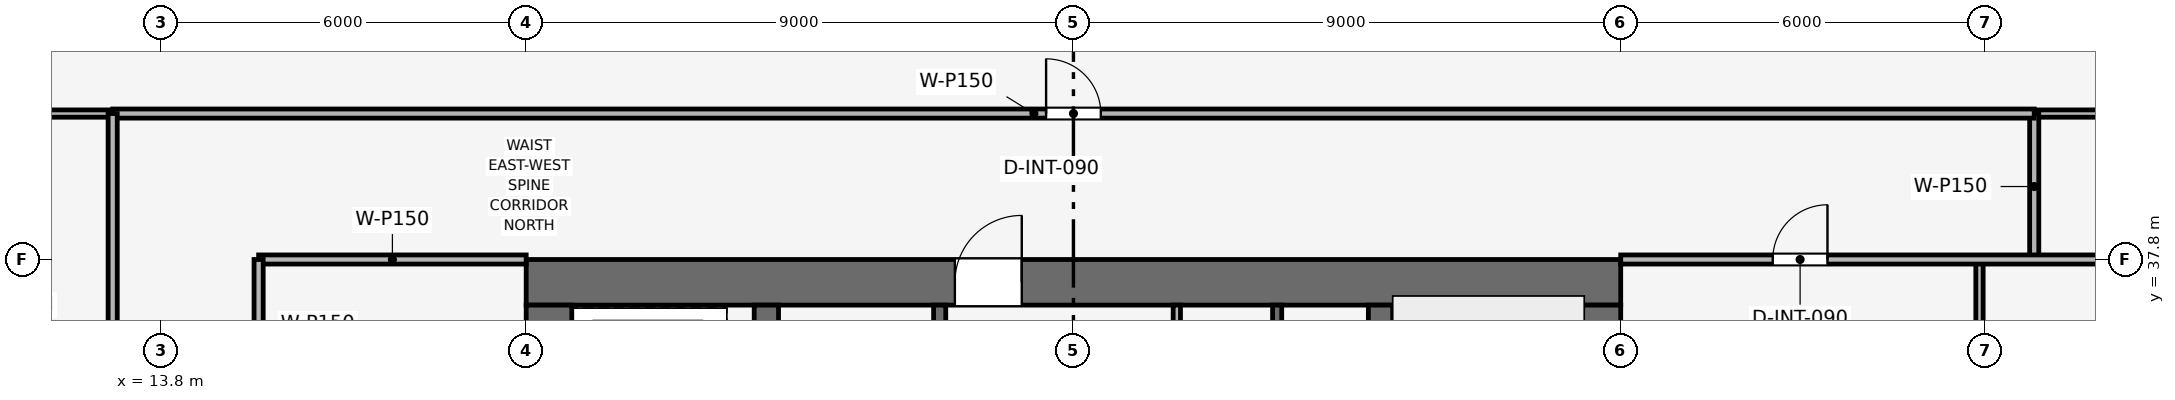
"""IFC4 building model, lengths in metres.
Left out: names, types, materials, properties, quantities, classifications, styles, units other than length and angle.
Written with IfcOpenShell. Run it as: python <this file> out.ifc"""

import sys

from ifc_helpers import new_model, si_unit, direction, frame, frame_2d, origin, place, context, subcontext, project, spatial, rectangle, extrude, element, fill, save


model = new_model("IFC4")
c1 = context("Model", 3, precision=1e-05, world=origin(), true_north=direction((0.0, 1.0)))
c2 = subcontext(c1, "Body", "Model", "MODEL_VIEW")
j1 = project(units=[si_unit("LENGTHUNIT", "METRE"), si_unit("PLANEANGLEUNIT", "RADIAN")], contexts=[c1])
p1 = place(None, origin())
s1 = spatial("IfcSite", under=j1, at=p1, CompositionType="ELEMENT")
p2 = place(p1, origin())
s2 = spatial("IfcBuilding", under=s1, at=p2, CompositionType="ELEMENT")
p3 = place(p2, frame((0.0, 0.0, 229.95)))
s3 = spatial("IfcBuildingStorey", under=s2, at=p3, CompositionType="ELEMENT", Elevation=229.95)
p4 = place(p3, frame((19.8, 37.425, 0.0), z_axis=(0.0, 0.0, 1.0), x_axis=(1.0, 0.0, 0.0)))
e1 = element("IfcWall", 1, at=p4, inside=s3, PredefinedType="SHEAR", context=c2, shape_type="SweptSolid", body=[
    extrude(rectangle(XDim=18.0, YDim=0.75, at=frame_2d((9.0, 0.0))), origin(), (0.0, 0.0, 1.0), 3.75),
])
p5 = place(p4, frame((7.05, 0.0, 0.0)))
e2 = element("IfcOpeningElement", 2, at=p5, cuts=e1, PredefinedType="OPENING", context=c2, shape_type="SweptSolid", body=[
    extrude(rectangle(XDim=1.1, YDim=2.15, at=frame_2d((0.55, 1.075))), frame((0.0, 0.385, 0.0), z_axis=(0.0, -1.0, 0.0), x_axis=(1.0, 0.0, 0.0)), (0.0, 0.0, 1.0), 0.77),
])
p6 = place(p3, frame((20.175, 20.55, 0.0), z_axis=(0.0, 0.0, 1.0), x_axis=(0.0, 1.0, 0.0)))
e3 = element("IfcWall", 3, at=p6, inside=s3, PredefinedType="SHEAR", context=c2, shape_type="SweptSolid", body=[
    extrude(rectangle(XDim=16.5, YDim=0.75, at=frame_2d((8.25, 0.0))), origin(), (0.0, 0.0, 1.0), 3.75),
])
p7 = place(p6, frame((10.25, 0.0, 0.0)))
e4 = element("IfcOpeningElement", 4, at=p7, cuts=e3, PredefinedType="OPENING", context=c2, shape_type="SweptSolid", body=[
    extrude(rectangle(XDim=1.1, YDim=2.15, at=frame_2d((0.55, 1.075))), frame((0.0, 0.385, 0.0), z_axis=(0.0, -1.0, 0.0), x_axis=(1.0, 0.0, 0.0)), (0.0, 0.0, 1.0), 0.77),
])
p8 = place(p3, frame((37.425, 20.55, 0.0), z_axis=(0.0, 0.0, 1.0), x_axis=(0.0, 1.0, 0.0)))
e5 = element("IfcWall", 5, at=p8, inside=s3, PredefinedType="SHEAR", context=c2, shape_type="SweptSolid", body=[
    extrude(rectangle(XDim=16.5, YDim=0.75, at=frame_2d((8.25, 0.0))), origin(), (0.0, 0.0, 1.0), 3.75),
])
p9 = place(p8, frame((4.75, 0.0, 0.0)))
e6 = element("IfcOpeningElement", 6, at=p9, cuts=e5, PredefinedType="OPENING", context=c2, shape_type="SweptSolid", body=[
    extrude(rectangle(XDim=1.1, YDim=2.15, at=frame_2d((0.55, 1.075))), frame((0.0, 0.385, 0.0), z_axis=(0.0, -1.0, 0.0), x_axis=(1.0, 0.0, 0.0)), (0.0, 0.0, 1.0), 0.77),
])
for number, where, z_axis, x_axis in (
    (7, (23.75, 20.55, 0.0), (0.0, 0.0, 1.0), (0.0, 1.0, 0.0)),
    (8, (33.85, 20.55, 0.0), (0.0, 0.0, 1.0), (0.0, 1.0, 0.0)),
):
    element("IfcWall", number, at=place(p3, frame(where, z_axis=z_axis, x_axis=x_axis)), inside=s3, PredefinedType="SHEAR", context=c2, shape_type="SweptSolid", body=[
        extrude(rectangle(XDim=16.5, YDim=0.4, at=frame_2d((8.25, 0.0))), origin(), (0.0, 0.0, 1.0), 3.75),
    ])
p10 = place(p3, frame((32.15, 34.0, 0.0), z_axis=(0.0, 0.0, 1.0), x_axis=(0.0, 1.0, 0.0)))
e9 = element("IfcWall", 9, at=p10, inside=s3, PredefinedType="SHEAR", context=c2, shape_type="SweptSolid", body=[
    extrude(rectangle(XDim=3.05, YDim=0.15, at=frame_2d((1.525, 0.0))), origin(), (0.0, 0.0, 1.0), 3.5),
])
p11 = place(p3, frame((26.6, 34.0, 0.0), z_axis=(0.0, 0.0, 1.0), x_axis=(0.0, 1.0, 0.0)))
e10 = element("IfcWall", 10, at=p11, inside=s3, PredefinedType="SHEAR", context=c2, shape_type="SweptSolid", body=[
    extrude(rectangle(XDim=3.05, YDim=0.2, at=frame_2d((1.525, 0.0))), origin(), (0.0, 0.0, 1.0), 3.5),
])
p12 = place(p11, frame((0.75, 0.0, 0.0)))
e11 = element("IfcOpeningElement", 11, at=p12, cuts=e10, PredefinedType="OPENING", context=c2, shape_type="SweptSolid", body=[
    extrude(rectangle(XDim=1.1, YDim=2.15, at=frame_2d((0.55, 1.075))), frame((0.0, 0.11, 0.0), z_axis=(0.0, -1.0, 0.0), x_axis=(1.0, 0.0, 0.0)), (0.0, 0.0, 1.0), 0.22),
])
p13 = place(p3, frame((30.5, 33.925, 0.0), z_axis=(0.0, 0.0, 1.0), x_axis=(0.0, 1.0, 0.0)))
e12 = element("IfcWall", 12, at=p13, inside=s3, PredefinedType="PARTITIONING", context=c2, shape_type="SweptSolid", body=[
    extrude(rectangle(XDim=3.125, YDim=0.12, at=frame_2d((1.562, 0.0))), origin(), (0.0, 0.0, 1.0), 3.5),
])
p14 = place(p13, frame((0.85, 0.0, 0.0)))
e13 = element("IfcOpeningElement", 13, at=p14, cuts=e12, PredefinedType="OPENING", context=c2, shape_type="SweptSolid", body=[
    extrude(rectangle(XDim=0.9, YDim=2.1, at=frame_2d((0.45, 1.05))), frame((0.0, 0.07, 0.0), z_axis=(0.0, -1.0, 0.0), x_axis=(1.0, 0.0, 0.0)), (0.0, 0.0, 1.0), 0.14),
])
p15 = place(p3, frame((15.4, 37.8, 0.0), z_axis=(0.0, 0.0, 1.0), x_axis=(1.0, 0.0, 0.0)))
e14 = element("IfcWall", 14, at=p15, inside=s3, PredefinedType="PARTITIONING", context=c2, shape_type="SweptSolid", body=[
    extrude(rectangle(XDim=4.4, YDim=0.15, at=frame_2d((2.2, 0.0))), origin(), (0.0, 0.0, 1.0), 3.035),
])
p16 = place(p3, frame((15.4, 32.45, 0.0), z_axis=(0.0, 0.0, 1.0), x_axis=(0.0, 1.0, 0.0)))
e15 = element("IfcWall", 15, at=p16, inside=s3, PredefinedType="PARTITIONING", context=c2, shape_type="SweptSolid", body=[
    extrude(rectangle(XDim=5.35, YDim=0.15, at=frame_2d((2.675, 0.0))), origin(), (0.0, 0.0, 1.0), 3.035),
])
p17 = place(p16, frame((2.1, 0.0, 0.0)))
e16 = element("IfcOpeningElement", 16, at=p17, cuts=e15, PredefinedType="OPENING", context=c2, shape_type="SweptSolid", body=[
    extrude(rectangle(XDim=0.9, YDim=2.1, at=frame_2d((0.45, 1.05))), frame((0.0, 0.085, 0.0), z_axis=(0.0, -1.0, 0.0), x_axis=(1.0, 0.0, 0.0)), (0.0, 0.0, 1.0), 0.17),
])
p18 = place(p3, frame((43.7, 26.85, 0.0), z_axis=(0.0, 0.0, 1.0), x_axis=(0.0, 1.0, 0.0)))
e17 = element("IfcWall", 17, at=p18, inside=s3, PredefinedType="PARTITIONING", context=c2, shape_type="SweptSolid", body=[
    extrude(rectangle(XDim=10.95, YDim=0.12, at=frame_2d((5.475, 0.0))), origin(), (0.0, 0.0, 1.0), 3.035),
])
p19 = place(p18, frame((5.025, 0.0, 0.0)))
e18 = element("IfcOpeningElement", 18, at=p19, cuts=e17, PredefinedType="OPENING", context=c2, shape_type="SweptSolid", body=[
    extrude(rectangle(XDim=0.9, YDim=2.1, at=frame_2d((0.45, 1.05))), frame((0.0, 0.07, 0.0), z_axis=(0.0, -1.0, 0.0), x_axis=(1.0, 0.0, 0.0)), (0.0, 0.0, 1.0), 0.14),
])
p20 = place(p3, frame((1.93, 40.2, 0.0), z_axis=(0.0, 0.0, 1.0), x_axis=(1.0, 0.0, 0.0)))
e19 = element("IfcWall", 19, at=p20, inside=s3, PredefinedType="PARTITIONING", context=c2, shape_type="SweptSolid", body=[
    extrude(rectangle(XDim=11.07, YDim=0.12, at=frame_2d((5.535, 0.0))), origin(), (0.0, 0.0, 1.0), 2.885),
])
p21 = place(p3, frame((44.6, 40.2, 0.0), z_axis=(0.0, 0.0, 1.0), x_axis=(1.0, 0.0, 0.0)))
e20 = element("IfcWall", 20, at=p21, inside=s3, PredefinedType="PARTITIONING", context=c2, shape_type="SweptSolid", body=[
    extrude(rectangle(XDim=11.07, YDim=0.12, at=frame_2d((5.535, 0.0))), origin(), (0.0, 0.0, 1.0), 2.885),
])
p22 = place(p3, frame((44.6, 37.8, 0.0), z_axis=(0.0, 0.0, 1.0), x_axis=(0.0, 1.0, 0.0)))
e21 = element("IfcWall", 21, at=p22, inside=s3, PredefinedType="PARTITIONING", context=c2, shape_type="SweptSolid", body=[
    extrude(rectangle(XDim=2.4, YDim=0.15, at=frame_2d((1.2, 0.0))), origin(), (0.0, 0.0, 1.0), 3.5),
])
p23 = place(p3, frame((37.8, 37.8, 0.0), z_axis=(0.0, 0.0, 1.0), x_axis=(1.0, 0.0, 0.0)))
e22 = element("IfcWall", 22, at=p23, inside=s3, PredefinedType="PARTITIONING", context=c2, shape_type="SweptSolid", body=[
    extrude(rectangle(XDim=17.87, YDim=0.15, at=frame_2d((8.935, 0.0))), origin(), (0.0, 0.0, 1.0), 2.885),
])
p24 = place(p23, frame((2.5, 0.0, 0.0)))
e23 = element("IfcOpeningElement", 23, at=p24, cuts=e22, PredefinedType="OPENING", context=c2, shape_type="SweptSolid", body=[
    extrude(rectangle(XDim=0.9, YDim=2.1, at=frame_2d((0.45, 1.05))), frame((0.0, 0.085, 0.0), z_axis=(0.0, -1.0, 0.0), x_axis=(1.0, 0.0, 0.0)), (0.0, 0.0, 1.0), 0.17),
])
p25 = place(p3, frame((13.0, 40.2, 0.0), z_axis=(0.0, 0.0, 1.0), x_axis=(1.0, 0.0, 0.0)))
e24 = element("IfcWall", 24, at=p25, inside=s3, PredefinedType="PARTITIONING", context=c2, shape_type="SweptSolid", body=[
    extrude(rectangle(XDim=31.6, YDim=0.15, at=frame_2d((15.8, 0.0))), origin(), (0.0, 0.0, 1.0), 3.035),
])
p26 = place(p25, frame((15.35, 0.0, 0.0)))
e25 = element("IfcOpeningElement", 25, at=p26, cuts=e24, PredefinedType="OPENING", context=c2, shape_type="SweptSolid", body=[
    extrude(rectangle(XDim=0.9, YDim=2.1, at=frame_2d((0.45, 1.05))), frame((0.0, 0.085, 0.0), z_axis=(0.0, -1.0, 0.0), x_axis=(1.0, 0.0, 0.0)), (0.0, 0.0, 1.0), 0.17),
])
p27 = place(p3, frame((13.0, 17.4, 0.0), z_axis=(0.0, 0.0, 1.0), x_axis=(0.0, 1.0, 0.0)))
e26 = element("IfcWall", 26, at=p27, inside=s3, PredefinedType="PARTITIONING", context=c2, shape_type="SweptSolid", body=[
    extrude(rectangle(XDim=22.8, YDim=0.15, at=frame_2d((11.4, 0.0))), origin(), (0.0, 0.0, 1.0), 3.035),
])
p28 = place(p27, frame((3.1, 0.0, 0.0)))
e27 = element("IfcOpeningElement", 27, at=p28, cuts=e26, PredefinedType="OPENING", context=c2, shape_type="SweptSolid", body=[
    extrude(rectangle(XDim=0.9, YDim=2.1, at=frame_2d((0.45, 1.05))), frame((0.0, 0.085, 0.0), z_axis=(0.0, -1.0, 0.0), x_axis=(1.0, 0.0, 0.0)), (0.0, 0.0, 1.0), 0.17),
])
p29 = place(p27, frame((6.529, 0.0, 0.0)))
e28 = element("IfcOpeningElement", 28, at=p29, cuts=e26, PredefinedType="OPENING", context=c2, shape_type="SweptSolid", body=[
    extrude(rectangle(XDim=0.9, YDim=2.1, at=frame_2d((0.45, 1.05))), frame((0.0, 0.085, 0.0), z_axis=(0.0, -1.0, 0.0), x_axis=(1.0, 0.0, 0.0)), (0.0, 0.0, 1.0), 0.17),
])
p30 = place(p27, frame((10.957, 0.0, 0.0)))
e29 = element("IfcOpeningElement", 29, at=p30, cuts=e26, PredefinedType="OPENING", context=c2, shape_type="SweptSolid", body=[
    extrude(rectangle(XDim=0.9, YDim=2.1, at=frame_2d((0.45, 1.05))), frame((0.0, 0.085, 0.0), z_axis=(0.0, -1.0, 0.0), x_axis=(1.0, 0.0, 0.0)), (0.0, 0.0, 1.0), 0.17),
])
p31 = place(p27, frame((16.527, 0.0, 0.0)))
e30 = element("IfcOpeningElement", 30, at=p31, cuts=e26, PredefinedType="OPENING", context=c2, shape_type="SweptSolid", body=[
    extrude(rectangle(XDim=0.9, YDim=2.1, at=frame_2d((0.45, 1.05))), frame((0.0, 0.085, 0.0), z_axis=(0.0, -1.0, 0.0), x_axis=(1.0, 0.0, 0.0)), (0.0, 0.0, 1.0), 0.17),
])
p32 = place(p24, origin())
e31 = element("IfcDoor", 31, at=p32, inside=s3, OperationType="SINGLE_SWING_RIGHT", PredefinedType="DOOR", context=c2, shape_type="SweptSolid", body=[
    extrude(rectangle(XDim=0.9, YDim=2.1, at=frame_2d((0.45, 1.05))), frame((0.0, 0.025, 0.0), z_axis=(0.0, -1.0, 0.0), x_axis=(1.0, 0.0, 0.0)), (0.0, 0.0, 1.0), 0.05),
])
fill(e23, e31)
p33 = place(p26, origin())
e32 = element("IfcDoor", 32, at=p33, inside=s3, OperationType="SINGLE_SWING_LEFT", PredefinedType="DOOR", context=c2, shape_type="SweptSolid", body=[
    extrude(rectangle(XDim=0.9, YDim=2.1, at=frame_2d((0.45, 1.05))), frame((0.0, 0.025, 0.0), z_axis=(0.0, -1.0, 0.0), x_axis=(1.0, 0.0, 0.0)), (0.0, 0.0, 1.0), 0.05),
])
fill(e25, e32)
p34 = place(p5, origin())
e33 = element("IfcDoor", 33, at=p34, inside=s3, OperationType="SINGLE_SWING_RIGHT", PredefinedType="DOOR", context=c2, shape_type="SweptSolid", body=[
    extrude(rectangle(XDim=1.1, YDim=2.15, at=frame_2d((0.55, 1.075))), frame((0.0, 0.025, 0.0), z_axis=(0.0, -1.0, 0.0), x_axis=(1.0, 0.0, 0.0)), (0.0, 0.0, 1.0), 0.05),
])
fill(e2, e33)
save(model, sys.argv[1])
